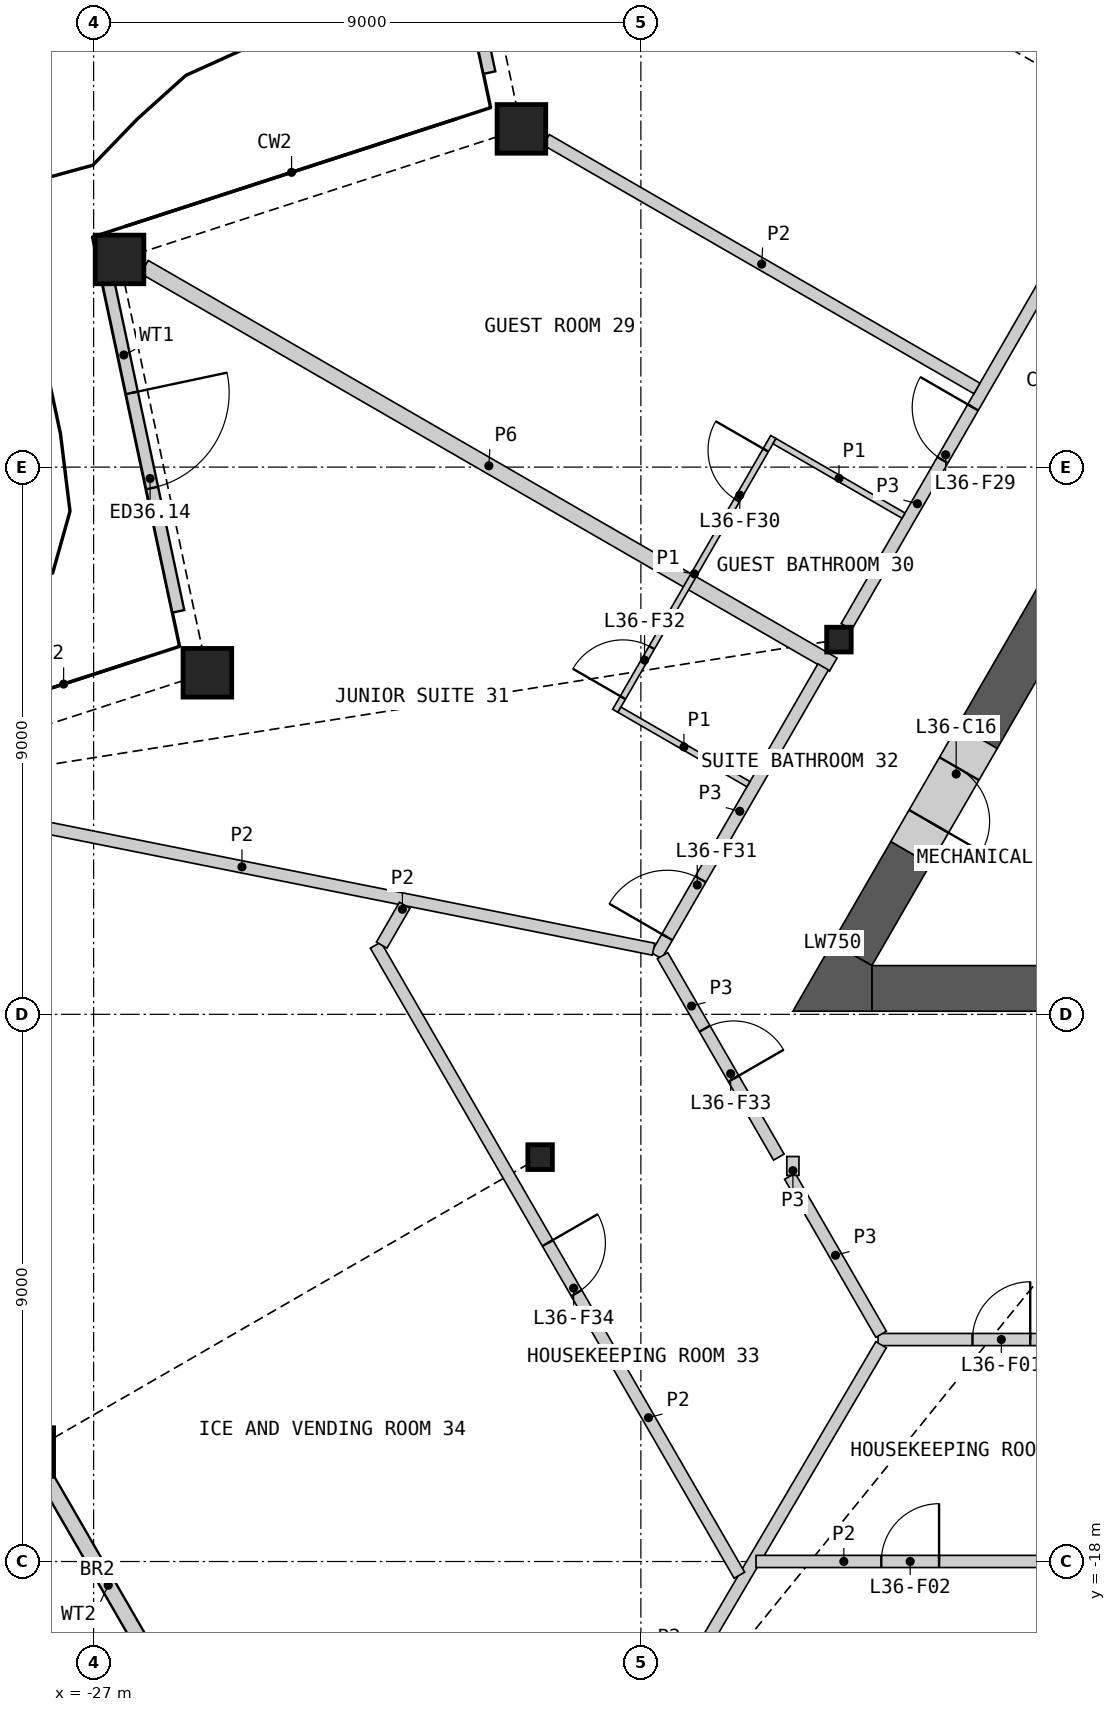
"""IFC4 building model, lengths in metres.
Left out: names, types, materials, properties, quantities, classifications, styles, units other than length and angle.
Written with IfcOpenShell. Run it as: python <this file> out.ifc"""

import sys

from ifc_helpers import new_model, si_unit, direction, frame, frame_2d, origin, origin_2d, place, context, subcontext, project, spatial, polyline, rectangle, hollow_rectangle, i_section, outline, extrude, element, fill, save


model = new_model("IFC4")
c1 = context("Model", 3, precision=1e-05, world=origin(), true_north=direction((0.0, 1.0)))
c2 = subcontext(c1, "Body", "Model", "MODEL_VIEW")
j1 = project(units=[si_unit("LENGTHUNIT", "METRE"), si_unit("PLANEANGLEUNIT", "RADIAN")], contexts=[c1])
p1 = place(None, origin())
s1 = spatial("IfcSite", under=j1, at=p1, CompositionType="ELEMENT")
p2 = place(p1, origin())
s2 = spatial("IfcBuilding", under=s1, at=p2, CompositionType="ELEMENT")
p3 = place(p2, frame((0.0, 0.0, 172.8)))
s3 = spatial("IfcBuildingStorey", under=s2, at=p3, CompositionType="ELEMENT", Elevation=172.8)
for number, where, z_axis, x_axis in (
    (1, (-19.965, 5.563, 0.0), (0.0, 0.0, 1.0), (1.0, 0.0, 0.0)),
    (2, (-26.574, 3.415, 0.0), (0.0, 0.0, 1.0), (1.0, 0.0, 0.0)),
    (3, (-25.129, -3.383, 0.0), (0.0, 0.0, 1.0), (1.0, 0.0, 0.0)),
    (4, (-28.059, -16.2, 0.0), (0.0, 0.0, 1.0), (1.0, 0.0, 0.0)),
):
    element("IfcColumn", number, at=place(p3, frame(where, z_axis=z_axis, x_axis=x_axis)), inside=s3, PredefinedType="COLUMN", context=c2, shape_type="SweptSolid", body=[
        extrude(hollow_rectangle(XDim=0.8, YDim=0.8, WallThickness=0.05, at=origin_2d()), origin(), (0.0, 0.0, 1.0), 3.6),
    ])
for number, where, z_axis, x_axis in (
    (5, (-14.743, -2.837, 0.0), (0.0, 0.0, 1.0), (1.0, 0.0, 0.0)),
    (6, (-19.657, -11.349, 0.0), (0.0, 0.0, 1.0), (1.0, 0.0, 0.0)),
):
    element("IfcColumn", number, at=place(p3, frame(where, z_axis=z_axis, x_axis=x_axis)), inside=s3, PredefinedType="COLUMN", context=c2, shape_type="SweptSolid", body=[
        extrude(i_section(OverallWidth=0.404, OverallDepth=0.407, WebThickness=0.027, FlangeThickness=0.044, at=origin_2d()), origin(), (0.0, 0.0, 1.0), 3.6),
    ])
p4 = place(p3, frame((-21.686, 12.111, 0.0), z_axis=(0.0, 0.0, 1.0), x_axis=(0.207872471739, -0.978155936184, 0.0)))
e7 = element("IfcWall", 7, at=p4, inside=s3, PredefinedType="SOLIDWALL", context=c2, shape_type="SweptSolid", body=[
    extrude(rectangle(XDim=5.748, YDim=0.2, at=frame_2d((2.874, 0.0))), origin(), (0.0, 0.0, 1.0), 2.701),
])
p5 = place(p4, frame((2.074, 0.0, 0.0)))
e8 = element("IfcOpeningElement", 8, at=p5, cuts=e7, PredefinedType="OPENING", context=c2, shape_type="SweptSolid", body=[
    extrude(rectangle(XDim=1.6, YDim=2.4, at=frame_2d((0.8, 1.2))), frame((0.0, 0.11, 0.0), z_axis=(0.0, -1.0, 0.0), x_axis=(1.0, 0.0, 0.0)), (0.0, 0.0, 1.0), 0.22),
])
p6 = place(p3, frame((-26.802, 3.25, 0.0), z_axis=(0.0, 0.0, 1.0), x_axis=(0.207921749173, -0.97814546271, 0.0)))
e9 = element("IfcWall", 9, at=p6, inside=s3, PredefinedType="SOLIDWALL", context=c2, shape_type="SweptSolid", body=[
    extrude(rectangle(XDim=5.748, YDim=0.2, at=frame_2d((2.874, 0.0))), origin(), (0.0, 0.0, 1.0), 2.701),
])
p7 = place(p6, frame((2.074, 0.0, 0.0)))
e10 = element("IfcOpeningElement", 10, at=p7, cuts=e9, PredefinedType="OPENING", context=c2, shape_type="SweptSolid", body=[
    extrude(rectangle(XDim=1.6, YDim=2.4, at=frame_2d((0.8, 1.2))), frame((0.0, 0.11, 0.0), z_axis=(0.0, -1.0, 0.0), x_axis=(1.0, 0.0, 0.0)), (0.0, 0.0, 1.0), 0.22),
])
p8 = place(p3, frame((-27.764, -16.65, 0.0), z_axis=(0.0, 0.0, 1.0), x_axis=(0.500039726511, -0.866002466458, 0.0)))
e11 = element("IfcWall", 11, at=p8, inside=s3, PredefinedType="SOLIDWALL", context=c2, shape_type="SweptSolid", body=[
    extrude(rectangle(XDim=4.019, YDim=0.25, at=frame_2d((2.009, 0.0))), origin(), (0.0, 0.0, 1.0), 2.701),
])
p9 = place(p3, frame((-14.201, -8.574, 0.0), z_axis=(0.0, 0.0, 1.0), x_axis=(1.0, 0.0, 0.0)))
e12 = element("IfcWall", 12, at=p9, inside=s3, PredefinedType="SHEAR", context=c2, shape_type="SweptSolid", body=[
    extrude(rectangle(XDim=6.785, YDim=0.75, at=frame_2d((3.393, 0.0))), origin(), (0.0, 0.0, 1.0), 3.25),
])
p10 = place(p3, frame((-11.133, -2.135, 0.0), z_axis=(0.0, 0.0, 1.0), x_axis=(-0.499936812382, -0.866061882099, 0.0)))
e13 = element("IfcWall", 13, at=p10, inside=s3, PredefinedType="SHEAR", context=c2, shape_type="SweptSolid", body=[
    extrude(rectangle(XDim=2.662, YDim=0.75, at=frame_2d((1.331, 0.0))), origin(), (0.0, 0.0, 1.0), 3.25),
])
p11 = place(p3, frame((-13.564, -6.346, 0.0), z_axis=(0.0, 0.0, 1.0), x_axis=(-0.499989888488, -0.86603124159, 0.0)))
e14 = element("IfcWall", 14, at=p11, inside=s3, PredefinedType="SHEAR", context=c2, shape_type="SweptSolid", body=[
    extrude(rectangle(XDim=1.923, YDim=0.75, at=frame_2d((0.961, 0.0))), origin(), (0.0, 0.0, 1.0), 3.25),
])
p12 = place(p3, origin())
e15 = element("IfcWall", 15, at=p12, inside=s3, PredefinedType="SHEAR", context=c2, shape_type="SweptSolid", body=[
    extrude(outline(polyline([(-14.851, -7.824), (-14.201, -8.199), (-14.201, -8.949), (-15.5, -8.949), (-14.851, -7.824)])), origin(), (0.0, 0.0, 1.0), 3.25),
])
p13 = place(p3, frame((-12.464, -4.441, 0.0), z_axis=(0.0, 0.0, 1.0), x_axis=(-0.499994660107, -0.866028486751, 0.0)))
e16 = element("IfcWall", 16, at=p13, inside=s3, PredefinedType="SHEAR", context=c2, shape_type="SweptSolid", body=[
    extrude(rectangle(XDim=2.2, YDim=0.75, at=frame_2d((1.1, 0.0))), origin(), (0.0, 0.0, 1.0), 3.25),
])
p14 = place(p13, frame((0.6, 0.0, 0.0)))
e17 = element("IfcOpeningElement", 17, at=p14, cuts=e16, PredefinedType="OPENING", context=c2, shape_type="SweptSolid", body=[
    extrude(rectangle(XDim=1.0, YDim=2.1, at=frame_2d((0.5, 1.05))), frame((0.0, 0.385, 0.0), z_axis=(0.0, -1.0, 0.0), x_axis=(1.0, 0.0, 0.0)), (0.0, 0.0, 1.0), 0.77),
])
p15 = place(p3, frame((-14.099, -14.349, 0.0), z_axis=(0.0, 0.0, 1.0), x_axis=(1.0, 0.0, 0.0)))
e18 = element("IfcWall", 18, at=p15, inside=s3, PredefinedType="PARTITIONING", context=c2, shape_type="SweptSolid", body=[
    extrude(rectangle(XDim=28.198, YDim=0.2, at=frame_2d((14.099, 0.0))), origin(), (0.0, 0.0, 1.0), 3.25),
])
p16 = place(p15, frame((1.552, 0.0, 0.0)))
e19 = element("IfcOpeningElement", 19, at=p16, cuts=e18, PredefinedType="OPENING", context=c2, shape_type="SweptSolid", body=[
    extrude(rectangle(XDim=0.95, YDim=2.1, at=frame_2d((0.475, 1.05))), frame((0.0, 0.11, 0.0), z_axis=(0.0, -1.0, 0.0), x_axis=(1.0, 0.0, 0.0)), (0.0, 0.0, 1.0), 0.22),
])
p17 = place(p15, frame((7.677, 0.0, 0.0)))
e20 = element("IfcOpeningElement", 20, at=p17, cuts=e18, PredefinedType="OPENING", context=c2, shape_type="SweptSolid", body=[
    extrude(rectangle(XDim=1.0, YDim=2.1, at=frame_2d((0.5, 1.05))), frame((0.0, 0.11, 0.0), z_axis=(0.0, -1.0, 0.0), x_axis=(1.0, 0.0, 0.0)), (0.0, 0.0, 1.0), 0.22),
])
p18 = place(p15, frame((9.283, 0.0, 0.0)))
e21 = element("IfcOpeningElement", 21, at=p18, cuts=e18, PredefinedType="OPENING", context=c2, shape_type="SweptSolid", body=[
    extrude(rectangle(XDim=1.0, YDim=2.1, at=frame_2d((0.5, 1.05))), frame((0.0, 0.11, 0.0), z_axis=(0.0, -1.0, 0.0), x_axis=(1.0, 0.0, 0.0)), (0.0, 0.0, 1.0), 0.22),
])
p19 = place(p15, frame((17.915, 0.0, 0.0)))
e22 = element("IfcOpeningElement", 22, at=p19, cuts=e18, PredefinedType="OPENING", context=c2, shape_type="SweptSolid", body=[
    extrude(rectangle(XDim=1.0, YDim=2.1, at=frame_2d((0.5, 1.05))), frame((0.0, 0.11, 0.0), z_axis=(0.0, -1.0, 0.0), x_axis=(1.0, 0.0, 0.0)), (0.0, 0.0, 1.0), 0.22),
])
p20 = place(p15, frame((19.521, 0.0, 0.0)))
e23 = element("IfcOpeningElement", 23, at=p20, cuts=e18, PredefinedType="OPENING", context=c2, shape_type="SweptSolid", body=[
    extrude(rectangle(XDim=1.0, YDim=2.1, at=frame_2d((0.5, 1.05))), frame((0.0, 0.11, 0.0), z_axis=(0.0, -1.0, 0.0), x_axis=(1.0, 0.0, 0.0)), (0.0, 0.0, 1.0), 0.22),
])
p21 = place(p15, frame((25.696, 0.0, 0.0)))
e24 = element("IfcOpeningElement", 24, at=p21, cuts=e18, PredefinedType="OPENING", context=c2, shape_type="SweptSolid", body=[
    extrude(rectangle(XDim=0.95, YDim=2.1, at=frame_2d((0.475, 1.05))), frame((0.0, 0.11, 0.0), z_axis=(0.0, -1.0, 0.0), x_axis=(1.0, 0.0, 0.0)), (0.0, 0.0, 1.0), 0.22),
])
p22 = place(p3, frame((-26.164, 3.292, 0.0), z_axis=(0.0, 0.0, 1.0), x_axis=(0.866022412254, -0.500005181446, 0.0)))
e25 = element("IfcWall", 25, at=p22, inside=s3, PredefinedType="PARTITIONING", context=c2, shape_type="SweptSolid", body=[
    extrude(rectangle(XDim=13.081, YDim=0.25, at=frame_2d((6.541, 0.0))), origin(), (0.0, 0.0, 1.0), 2.404),
])
p23 = place(p3, frame((-14.619, -2.624, 0.0), z_axis=(0.0, 0.0, 1.0), x_axis=(0.50000393355, 0.866023132736, 0.0)))
e26 = element("IfcWall", 26, at=p23, inside=s3, PredefinedType="PARTITIONING", context=c2, shape_type="SweptSolid", body=[
    extrude(rectangle(XDim=9.335, YDim=0.2, at=frame_2d((4.667, 0.0))), origin(), (0.0, 0.0, 1.0), 3.25),
])
p24 = place(p23, frame((3.163, 0.0, 0.0)))
e27 = element("IfcOpeningElement", 27, at=p24, cuts=e26, PredefinedType="OPENING", context=c2, shape_type="SweptSolid", body=[
    extrude(rectangle(XDim=1.0, YDim=2.1, at=frame_2d((0.5, 1.05))), frame((0.0, 0.11, 0.0), z_axis=(0.0, -1.0, 0.0), x_axis=(1.0, 0.0, 0.0)), (0.0, 0.0, 1.0), 0.22),
])
p25 = place(p3, frame((-17.744, -8.035, 0.0), z_axis=(0.0, 0.0, 1.0), x_axis=(0.500007607708, 0.866021011428, 0.0)))
e28 = element("IfcWall", 28, at=p25, inside=s3, PredefinedType="PARTITIONING", context=c2, shape_type="SweptSolid", body=[
    extrude(rectangle(XDim=5.484, YDim=0.2, at=frame_2d((2.742, 0.0))), origin(), (0.0, 0.0, 1.0), 3.25),
])
p26 = place(p25, frame((0.352, 0.0, 0.0)))
e29 = element("IfcOpeningElement", 29, at=p26, cuts=e28, PredefinedType="OPENING", context=c2, shape_type="SweptSolid", body=[
    extrude(rectangle(XDim=1.1, YDim=2.1, at=frame_2d((0.55, 1.05))), frame((0.0, 0.11, 0.0), z_axis=(0.0, -1.0, 0.0), x_axis=(1.0, 0.0, 0.0)), (0.0, 0.0, 1.0), 0.22),
])
p27 = place(p3, frame((-17.644, -8.035, 0.0), z_axis=(0.0, 0.0, 1.0), x_axis=(0.499961815444, -0.866047448526, 0.0)))
e30 = element("IfcWall", 30, at=p27, inside=s3, PredefinedType="PARTITIONING", context=c2, shape_type="SweptSolid", body=[
    extrude(rectangle(XDim=3.826, YDim=0.2, at=frame_2d((1.913, 0.0))), origin(), (0.0, 0.0, 1.0), 3.25),
])
p28 = place(p27, frame((1.386, 0.0, 0.0)))
e31 = element("IfcOpeningElement", 31, at=p28, cuts=e30, PredefinedType="OPENING", context=c2, shape_type="SweptSolid", body=[
    extrude(rectangle(XDim=0.95, YDim=2.1, at=frame_2d((0.475, 1.05))), frame((0.0, 0.11, 0.0), z_axis=(0.0, -1.0, 0.0), x_axis=(1.0, 0.0, 0.0)), (0.0, 0.0, 1.0), 0.22),
])
p29 = place(p3, frame((-15.55, -11.662, 0.0), z_axis=(0.0, 0.0, 1.0), x_axis=(0.500048608389, -0.865997337899, 0.0)))
e32 = element("IfcWall", 32, at=p29, inside=s3, PredefinedType="PARTITIONING", context=c2, shape_type="SweptSolid", body=[
    extrude(rectangle(XDim=3.002, YDim=0.2, at=frame_2d((1.501, 0.0))), origin(), (0.0, 0.0, 1.0), 3.25),
])
p30 = place(p3, frame((-15.5, -11.649, 0.0), z_axis=(0.0, 0.0, 1.0), x_axis=(0.0, 1.0, 0.0)))
e33 = element("IfcWall", 33, at=p30, inside=s3, PredefinedType="PARTITIONING", context=c2, shape_type="SweptSolid", body=[
    extrude(rectangle(XDim=0.31, YDim=0.2, at=frame_2d((0.155, 0.0))), origin(), (0.0, 0.0, 1.0), 3.25),
])
p31 = place(p3, frame((-31.329, -5.221, 0.0), z_axis=(0.0, 0.0, 1.0), x_axis=(0.980565709097, -0.196190953266, 0.0)))
e34 = element("IfcWall", 34, at=p31, inside=s3, PredefinedType="PARTITIONING", context=c2, shape_type="SweptSolid", body=[
    extrude(rectangle(XDim=13.805, YDim=0.2, at=frame_2d((6.903, 0.0))), origin(), (0.0, 0.0, 1.0), 2.404),
])
p32 = place(p3, frame((-20.046, -24.632, 0.0), z_axis=(0.0, 0.0, 1.0), x_axis=(0.50691549935, 0.86199575203, 0.0)))
e35 = element("IfcWall", 35, at=p32, inside=s3, PredefinedType="PARTITIONING", context=c2, shape_type="SweptSolid", body=[
    extrude(rectangle(XDim=11.83, YDim=0.2, at=frame_2d((5.915, 0.0))), origin(), (0.0, 0.0, 1.0), 2.404),
])
p33 = place(p3, frame((-22.363, -7.862, 0.0), z_axis=(0.0, 0.0, 1.0), x_axis=(0.500009728207, -0.866019787128, 0.0)))
e36 = element("IfcWall", 36, at=p33, inside=s3, PredefinedType="PARTITIONING", context=c2, shape_type="SweptSolid", body=[
    extrude(rectangle(XDim=11.967, YDim=0.2, at=frame_2d((5.983, 0.0))), origin(), (0.0, 0.0, 1.0), 2.404),
])
p34 = place(p33, frame((5.658, 0.0, 0.0)))
e37 = element("IfcOpeningElement", 37, at=p34, cuts=e36, PredefinedType="OPENING", context=c2, shape_type="SweptSolid", body=[
    extrude(rectangle(XDim=0.95, YDim=2.1, at=frame_2d((0.475, 1.05))), frame((0.0, 0.11, 0.0), z_axis=(0.0, -1.0, 0.0), x_axis=(1.0, 0.0, 0.0)), (0.0, 0.0, 1.0), 0.22),
])
p35 = place(p3, frame((-19.555, 5.383, 0.0), z_axis=(0.0, 0.0, 1.0), x_axis=(0.866027979776, -0.499995538225, 0.0)))
e38 = element("IfcWall", 38, at=p35, inside=s3, PredefinedType="PARTITIONING", context=c2, shape_type="SweptSolid", body=[
    extrude(rectangle(XDim=8.177, YDim=0.2, at=frame_2d((4.089, 0.0))), origin(), (0.0, 0.0, 1.0), 2.404),
])
p36 = place(p3, frame((-16.106, -17.999, 0.0), z_axis=(0.0, 0.0, 1.0), x_axis=(1.0, 0.0, 0.0)))
e39 = element("IfcWall", 39, at=p36, inside=s3, PredefinedType="PARTITIONING", context=c2, shape_type="SweptSolid", body=[
    extrude(rectangle(XDim=5.775, YDim=0.2, at=frame_2d((2.887, 0.0))), origin(), (0.0, 0.0, 1.0), 2.404),
])
p37 = place(p36, frame((2.06, 0.0, 0.0)))
e40 = element("IfcOpeningElement", 40, at=p37, cuts=e39, PredefinedType="OPENING", context=c2, shape_type="SweptSolid", body=[
    extrude(rectangle(XDim=0.95, YDim=2.1, at=frame_2d((0.475, 1.05))), frame((0.0, 0.11, 0.0), z_axis=(0.0, -1.0, 0.0), x_axis=(1.0, 0.0, 0.0)), (0.0, 0.0, 1.0), 0.22),
])
p38 = place(p3, frame((-22.263, -7.862, 0.0), z_axis=(0.0, 0.0, 1.0), x_axis=(0.499852814723, 0.866110364569, 0.0)))
e41 = element("IfcWall", 41, at=p38, inside=s3, PredefinedType="PARTITIONING", context=c2, shape_type="SweptSolid", body=[
    extrude(rectangle(XDim=0.757, YDim=0.2, at=frame_2d((0.378, 0.0))), origin(), (0.0, 0.0, 1.0), 2.404),
])
p39 = place(p3, frame((-18.421, -4.008, 0.0), z_axis=(0.0, 0.0, 1.0), x_axis=(0.500006934395, 0.866021400173, 0.0)))
e42 = element("IfcWall", 42, at=p39, inside=s3, PredefinedType="PARTITIONING", context=c2, shape_type="SweptSolid", body=[
    extrude(rectangle(XDim=5.2, YDim=0.1, at=frame_2d((2.6, 0.0))), origin(), (0.0, 0.0, 1.0), 2.404),
])
p40 = place(p39, frame((4.0, 0.0, 0.0)))
e43 = element("IfcOpeningElement", 43, at=p40, cuts=e42, PredefinedType="OPENING", context=c2, shape_type="SweptSolid", body=[
    extrude(rectangle(XDim=0.95, YDim=2.1, at=frame_2d((0.475, 1.05))), frame((0.0, 0.06, 0.0), z_axis=(0.0, -1.0, 0.0), x_axis=(1.0, 0.0, 0.0)), (0.0, 0.0, 1.0), 0.12),
])
p41 = place(p39, frame((0.25, 0.0, 0.0)))
e44 = element("IfcOpeningElement", 44, at=p41, cuts=e42, PredefinedType="OPENING", context=c2, shape_type="SweptSolid", body=[
    extrude(rectangle(XDim=0.95, YDim=2.1, at=frame_2d((0.475, 1.05))), frame((0.0, 0.06, 0.0), z_axis=(0.0, -1.0, 0.0), x_axis=(1.0, 0.0, 0.0)), (0.0, 0.0, 1.0), 0.12),
])
p42 = place(p3, frame((-18.353, -3.99, 0.0), z_axis=(0.0, 0.0, 1.0), x_axis=(0.866057815567, -0.499943856944, 0.0)))
e45 = element("IfcWall", 45, at=p42, inside=s3, PredefinedType="PARTITIONING", context=c2, shape_type="SweptSolid", body=[
    extrude(rectangle(XDim=2.45, YDim=0.1, at=frame_2d((1.225, 0.0))), origin(), (0.0, 0.0, 1.0), 2.404),
])
p43 = place(p3, frame((-15.802, 0.427, 0.0), z_axis=(0.0, 0.0, 1.0), x_axis=(0.866032905446, -0.499987006516, 0.0)))
e46 = element("IfcWall", 46, at=p43, inside=s3, PredefinedType="PARTITIONING", context=c2, shape_type="SweptSolid", body=[
    extrude(rectangle(XDim=2.45, YDim=0.1, at=frame_2d((1.225, 0.0))), origin(), (0.0, 0.0, 1.0), 2.404),
])
p44 = place(p7, origin())
e47 = element("IfcDoor", 47, at=p44, inside=s3, OperationType="DOUBLE_DOOR_SINGLE_SWING", PredefinedType="DOOR", context=c2, shape_type="SweptSolid", body=[
    extrude(rectangle(XDim=1.6, YDim=2.4, at=frame_2d((0.8, 1.2))), frame((0.0, 0.025, 0.0), z_axis=(0.0, -1.0, 0.0), x_axis=(1.0, 0.0, 0.0)), (0.0, 0.0, 1.0), 0.05),
])
fill(e10, e47)
p45 = place(p14, origin())
e48 = element("IfcDoor", 48, at=p45, inside=s3, OperationType="SINGLE_SWING_RIGHT", PredefinedType="DOOR", context=c2, shape_type="SweptSolid", body=[
    extrude(rectangle(XDim=1.0, YDim=2.1, at=frame_2d((0.5, 1.05))), frame((0.0, 0.13, 0.0), z_axis=(0.0, -1.0, 0.0), x_axis=(1.0, 0.0, 0.0)), (0.0, 0.0, 1.0), 0.05),
])
fill(e17, e48)
p46 = place(p16, origin())
e49 = element("IfcDoor", 49, at=p46, inside=s3, OperationType="SINGLE_SWING_RIGHT", PredefinedType="DOOR", context=c2, shape_type="SweptSolid", body=[
    extrude(rectangle(XDim=0.95, YDim=2.1, at=frame_2d((0.475, 1.05))), frame((0.0, 0.025, 0.0), z_axis=(0.0, -1.0, 0.0), x_axis=(1.0, 0.0, 0.0)), (0.0, 0.0, 1.0), 0.05),
])
fill(e19, e49)
p47 = place(p37, origin())
e50 = element("IfcDoor", 50, at=p47, inside=s3, OperationType="SINGLE_SWING_RIGHT", PredefinedType="DOOR", context=c2, shape_type="SweptSolid", body=[
    extrude(rectangle(XDim=0.95, YDim=2.1, at=frame_2d((0.475, 1.05))), frame((0.0, 0.025, 0.0), z_axis=(0.0, -1.0, 0.0), x_axis=(1.0, 0.0, 0.0)), (0.0, 0.0, 1.0), 0.05),
])
fill(e40, e50)
p48 = place(p24, origin())
e51 = element("IfcDoor", 51, at=p48, inside=s3, OperationType="SINGLE_SWING_RIGHT", PredefinedType="DOOR", context=c2, shape_type="SweptSolid", body=[
    extrude(rectangle(XDim=1.0, YDim=2.1, at=frame_2d((0.5, 1.05))), frame((0.0, 0.025, 0.0), z_axis=(0.0, -1.0, 0.0), x_axis=(1.0, 0.0, 0.0)), (0.0, 0.0, 1.0), 0.05),
])
fill(e27, e51)
p49 = place(p40, origin())
e52 = element("IfcDoor", 52, at=p49, inside=s3, OperationType="SINGLE_SWING_RIGHT", PredefinedType="DOOR", context=c2, shape_type="SweptSolid", body=[
    extrude(rectangle(XDim=0.95, YDim=2.1, at=frame_2d((0.475, 1.05))), frame((0.0, 0.025, 0.0), z_axis=(0.0, -1.0, 0.0), x_axis=(1.0, 0.0, 0.0)), (0.0, 0.0, 1.0), 0.05),
])
fill(e43, e52)
p50 = place(p26, origin())
e53 = element("IfcDoor", 53, at=p50, inside=s3, OperationType="SINGLE_SWING_LEFT", PredefinedType="DOOR", context=c2, shape_type="SweptSolid", body=[
    extrude(rectangle(XDim=1.1, YDim=2.1, at=frame_2d((0.55, 1.05))), frame((0.0, 0.025, 0.0), z_axis=(0.0, -1.0, 0.0), x_axis=(1.0, 0.0, 0.0)), (0.0, 0.0, 1.0), 0.05),
])
fill(e29, e53)
p51 = place(p41, origin())
e54 = element("IfcDoor", 54, at=p51, inside=s3, OperationType="SINGLE_SWING_LEFT", PredefinedType="DOOR", context=c2, shape_type="SweptSolid", body=[
    extrude(rectangle(XDim=0.95, YDim=2.1, at=frame_2d((0.475, 1.05))), frame((0.0, 0.025, 0.0), z_axis=(0.0, -1.0, 0.0), x_axis=(1.0, 0.0, 0.0)), (0.0, 0.0, 1.0), 0.05),
])
fill(e44, e54)
p52 = place(p28, origin())
e55 = element("IfcDoor", 55, at=p52, inside=s3, OperationType="SINGLE_SWING_RIGHT", PredefinedType="DOOR", context=c2, shape_type="SweptSolid", body=[
    extrude(rectangle(XDim=0.95, YDim=2.1, at=frame_2d((0.475, 1.05))), frame((0.0, 0.025, 0.0), z_axis=(0.0, -1.0, 0.0), x_axis=(1.0, 0.0, 0.0)), (0.0, 0.0, 1.0), 0.05),
])
fill(e31, e55)
p53 = place(p34, origin())
e56 = element("IfcDoor", 56, at=p53, inside=s3, OperationType="SINGLE_SWING_LEFT", PredefinedType="DOOR", context=c2, shape_type="SweptSolid", body=[
    extrude(rectangle(XDim=0.95, YDim=2.1, at=frame_2d((0.475, 1.05))), frame((0.0, 0.025, 0.0), z_axis=(0.0, -1.0, 0.0), x_axis=(1.0, 0.0, 0.0)), (0.0, 0.0, 1.0), 0.05),
])
fill(e37, e56)
save(model, sys.argv[1])
